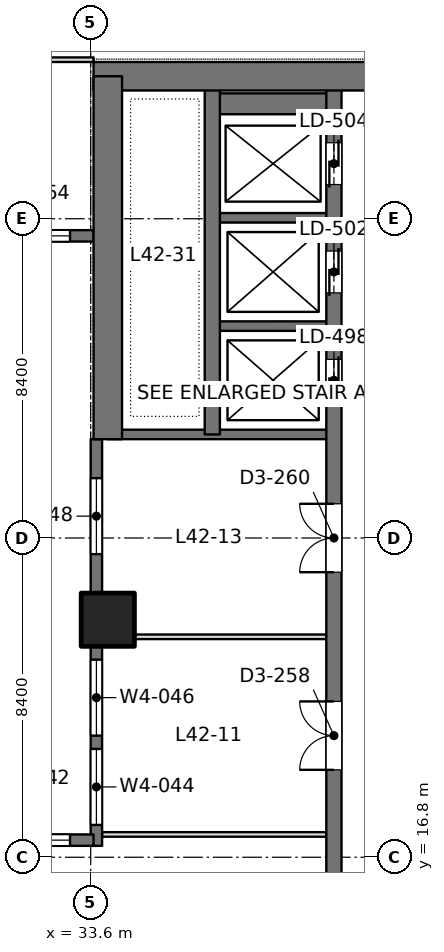
"""IFC4 building model, lengths in metres.
Left out: names, types, materials, properties, quantities, classifications, styles, units other than length and angle.
Written with IfcOpenShell. Run it as: python <this file> out.ifc"""

import sys

from ifc_helpers import new_model, si_unit, direction, frame, frame_2d, origin, origin_2d, place, context, subcontext, project, spatial, rectangle, extrude, element, fill, save


model = new_model("IFC4")
c1 = context("Model", 3, precision=1e-05, world=origin(), true_north=direction((0.0, 1.0)))
c2 = subcontext(c1, "Body", "Model", "MODEL_VIEW")
j1 = project(units=[si_unit("LENGTHUNIT", "METRE"), si_unit("PLANEANGLEUNIT", "RADIAN")], contexts=[c1])
p1 = place(None, origin())
s1 = spatial("IfcSite", under=j1, at=p1, CompositionType="ELEMENT")
p2 = place(p1, origin())
s2 = spatial("IfcBuilding", under=s1, at=p2, CompositionType="ELEMENT")
p3 = place(p2, frame((0.0, 0.0, 186.0)))
s3 = spatial("IfcBuildingStorey", under=s2, at=p3, CompositionType="ELEMENT", Elevation=186.0)
p4 = place(p3, frame((34.05, 23.05, 0.0), z_axis=(0.0, 0.0, 1.0), x_axis=(1.0, 0.0, 0.0)))
e1 = element("IfcColumn", 1, at=p4, inside=s3, PredefinedType="COLUMN", context=c2, shape_type="SweptSolid", body=[
    extrude(rectangle(XDim=1.4, YDim=1.4, at=origin_2d()), origin(), (0.0, 0.0, 1.0), 4.2),
])
p5 = place(p3, frame((33.675, 37.35, 0.0), z_axis=(0.0, 0.0, 1.0), x_axis=(1.0, 0.0, 0.0)))
e2 = element("IfcWall", 2, at=p5, inside=s3, PredefinedType="SHEAR", context=c2, shape_type="SweptSolid", body=[
    extrude(rectangle(XDim=17.85, YDim=0.75, at=frame_2d((8.925, 0.0))), origin(), (0.0, 0.0, 1.0), 4.2),
])
p6 = place(p5, frame((7.175, 0.0, 0.0)))
e3 = element("IfcOpeningElement", 3, at=p6, cuts=e2, PredefinedType="OPENING", context=c2, shape_type="SweptSolid", body=[
    extrude(rectangle(XDim=1.8, YDim=2.4, at=frame_2d((0.9, 1.2))), frame((0.0, 0.385, 0.0), z_axis=(0.0, -1.0, 0.0), x_axis=(1.0, 0.0, 0.0)), (0.0, 0.0, 1.0), 0.77),
])
p7 = place(p3, frame((34.05, 27.8, 0.0), z_axis=(0.0, 0.0, 1.0), x_axis=(0.0, 1.0, 0.0)))
e4 = element("IfcWall", 4, at=p7, inside=s3, PredefinedType="SHEAR", context=c2, shape_type="SweptSolid", body=[
    extrude(rectangle(XDim=9.55, YDim=0.75, at=frame_2d((4.775, 0.0))), origin(), (0.0, 0.0, 1.0), 4.2),
])
p8 = place(p3, frame((40.0, 13.05, 0.0), z_axis=(0.0, 0.0, 1.0), x_axis=(0.0, 1.0, 0.0)))
e5 = element("IfcWall", 5, at=p8, inside=s3, PredefinedType="SHEAR", context=c2, shape_type="SweptSolid", body=[
    extrude(rectangle(XDim=24.3, YDim=0.4, at=frame_2d((12.15, 0.0))), origin(), (0.0, 0.0, 1.0), 4.2),
])
p9 = place(p8, frame((15.75, 0.0, 0.0)))
e6 = element("IfcOpeningElement", 6, at=p9, cuts=e5, PredefinedType="OPENING", context=c2, shape_type="SweptSolid", body=[
    extrude(rectangle(XDim=1.1, YDim=2.2, at=frame_2d((0.55, 1.1))), frame((0.0, 0.21, 0.0), z_axis=(0.0, -1.0, 0.0), x_axis=(1.0, 0.0, 0.0)), (0.0, 0.0, 1.0), 0.42),
])
p10 = place(p8, frame((18.6, 0.0, 0.0)))
e7 = element("IfcOpeningElement", 7, at=p10, cuts=e5, PredefinedType="OPENING", context=c2, shape_type="SweptSolid", body=[
    extrude(rectangle(XDim=1.1, YDim=2.2, at=frame_2d((0.55, 1.1))), frame((0.0, 0.21, 0.0), z_axis=(0.0, -1.0, 0.0), x_axis=(1.0, 0.0, 0.0)), (0.0, 0.0, 1.0), 0.42),
])
p11 = place(p8, frame((21.45, 0.0, 0.0)))
e8 = element("IfcOpeningElement", 8, at=p11, cuts=e5, PredefinedType="OPENING", context=c2, shape_type="SweptSolid", body=[
    extrude(rectangle(XDim=1.1, YDim=2.2, at=frame_2d((0.55, 1.1))), frame((0.0, 0.21, 0.0), z_axis=(0.0, -1.0, 0.0), x_axis=(1.0, 0.0, 0.0)), (0.0, 0.0, 1.0), 0.42),
])
p12 = place(p8, frame((6.05, 0.0, 0.0)))
e9 = element("IfcOpeningElement", 9, at=p12, cuts=e5, PredefinedType="OPENING", context=c2, shape_type="SweptSolid", body=[
    extrude(rectangle(XDim=1.8, YDim=2.4, at=frame_2d((0.9, 1.2))), frame((0.0, 0.21, 0.0), z_axis=(0.0, -1.0, 0.0), x_axis=(1.0, 0.0, 0.0)), (0.0, 0.0, 1.0), 0.42),
])
p13 = place(p8, frame((11.25, 0.0, 0.0)))
e10 = element("IfcOpeningElement", 10, at=p13, cuts=e5, PredefinedType="OPENING", context=c2, shape_type="SweptSolid", body=[
    extrude(rectangle(XDim=1.8, YDim=2.4, at=frame_2d((0.9, 1.2))), frame((0.0, 0.21, 0.0), z_axis=(0.0, -1.0, 0.0), x_axis=(1.0, 0.0, 0.0)), (0.0, 0.0, 1.0), 0.42),
])
p14 = place(p3, frame((36.8, 27.925, 0.0), z_axis=(0.0, 0.0, 1.0), x_axis=(0.0, 1.0, 0.0)))
e11 = element("IfcWall", 11, at=p14, inside=s3, PredefinedType="SHEAR", context=c2, shape_type="SweptSolid", body=[
    extrude(rectangle(XDim=9.425, YDim=0.4, at=frame_2d((4.712, 0.0))), origin(), (0.0, 0.0, 1.0), 4.2),
])
p15 = place(p3, frame((40.0, 27.925, 0.0), z_axis=(0.0, 0.0, 1.0), x_axis=(-1.0, 0.0, 0.0)))
e12 = element("IfcWall", 12, at=p15, inside=s3, PredefinedType="SHEAR", context=c2, shape_type="SweptSolid", body=[
    extrude(rectangle(XDim=5.95, YDim=0.25, at=frame_2d((2.975, 0.0))), origin(), (0.0, 0.0, 1.0), 4.2),
])
for number, where, z_axis, x_axis in (
    (13, (40.0, 30.775, 0.0), (0.0, 0.0, 1.0), (-1.0, 0.0, 0.0)),
    (14, (40.0, 33.625, 0.0), (0.0, 0.0, 1.0), (-1.0, 0.0, 0.0)),
):
    element("IfcWall", number, at=place(p3, frame(where, z_axis=z_axis, x_axis=x_axis)), inside=s3, PredefinedType="SHEAR", context=c2, shape_type="SweptSolid", body=[
        extrude(rectangle(XDim=3.2, YDim=0.25, at=frame_2d((1.6, 0.0))), origin(), (0.0, 0.0, 1.0), 4.2),
    ])
p16 = place(p3, frame((40.0, 36.625, 0.0), z_axis=(0.0, 0.0, 1.0), x_axis=(-1.0, 0.0, 0.0)))
e15 = element("IfcWall", 15, at=p16, inside=s3, PredefinedType="SHEAR", context=c2, shape_type="SweptSolid", body=[
    extrude(rectangle(XDim=3.2, YDim=0.55, at=frame_2d((1.6, 0.0))), origin(), (0.0, 0.0, 1.0), 4.2),
])
p17 = place(p3, frame((33.75, 17.1, 0.0), z_axis=(0.0, 0.0, 1.0), x_axis=(0.0, 1.0, 0.0)))
e16 = element("IfcWall", 16, at=p17, inside=s3, PredefinedType="SOLIDWALL", context=c2, shape_type="SweptSolid", body=[
    extrude(rectangle(XDim=10.7, YDim=0.3, at=frame_2d((5.35, 0.0))), origin(), (0.0, 0.0, 1.0), 4.05),
])
p18 = place(p17, frame((0.55, 0.0, 0.9)))
e17 = element("IfcOpeningElement", 17, at=p18, cuts=e16, PredefinedType="OPENING", context=c2, shape_type="SweptSolid", body=[
    extrude(rectangle(XDim=2.0, YDim=1.9, at=frame_2d((1.0, 0.95))), frame((0.0, 0.16, 0.0), z_axis=(0.0, -1.0, 0.0), x_axis=(1.0, 0.0, 0.0)), (0.0, 0.0, 1.0), 0.32),
])
p19 = place(p17, frame((2.9, 0.0, 0.9)))
e18 = element("IfcOpeningElement", 18, at=p19, cuts=e16, PredefinedType="OPENING", context=c2, shape_type="SweptSolid", body=[
    extrude(rectangle(XDim=2.0, YDim=1.9, at=frame_2d((1.0, 0.95))), frame((0.0, 0.16, 0.0), z_axis=(0.0, -1.0, 0.0), x_axis=(1.0, 0.0, 0.0)), (0.0, 0.0, 1.0), 0.32),
])
p20 = place(p17, frame((7.675, 0.0, 0.9)))
e19 = element("IfcOpeningElement", 19, at=p20, cuts=e16, PredefinedType="OPENING", context=c2, shape_type="SweptSolid", body=[
    extrude(rectangle(XDim=2.0, YDim=1.9, at=frame_2d((1.0, 0.95))), frame((0.0, 0.16, 0.0), z_axis=(0.0, -1.0, 0.0), x_axis=(1.0, 0.0, 0.0)), (0.0, 0.0, 1.0), 0.32),
])
p21 = place(p3, frame((25.75, 17.25, 0.0), z_axis=(0.0, 0.0, 1.0), x_axis=(1.0, 0.0, 0.0)))
e20 = element("IfcWall", 20, at=p21, inside=s3, PredefinedType="SOLIDWALL", context=c2, shape_type="SweptSolid", body=[
    extrude(rectangle(XDim=7.925, YDim=0.3, at=frame_2d((3.962, 0.0))), origin(), (0.0, 0.0, 1.0), 4.05),
])
p22 = place(p21, frame((0.069, 0.0, 0.9)))
e21 = element("IfcOpeningElement", 21, at=p22, cuts=e20, PredefinedType="OPENING", context=c2, shape_type="SweptSolid", body=[
    extrude(rectangle(XDim=2.0, YDim=1.9, at=frame_2d((1.0, 0.95))), frame((0.0, 0.16, 0.0), z_axis=(0.0, -1.0, 0.0), x_axis=(1.0, 0.0, 0.0)), (0.0, 0.0, 1.0), 0.32),
])
p23 = place(p21, frame((2.688, 0.0, 0.9)))
e22 = element("IfcOpeningElement", 22, at=p23, cuts=e20, PredefinedType="OPENING", context=c2, shape_type="SweptSolid", body=[
    extrude(rectangle(XDim=2.0, YDim=1.9, at=frame_2d((1.0, 0.95))), frame((0.0, 0.16, 0.0), z_axis=(0.0, -1.0, 0.0), x_axis=(1.0, 0.0, 0.0)), (0.0, 0.0, 1.0), 0.32),
])
p24 = place(p21, frame((5.306, 0.0, 0.9)))
e23 = element("IfcOpeningElement", 23, at=p24, cuts=e20, PredefinedType="OPENING", context=c2, shape_type="SweptSolid", body=[
    extrude(rectangle(XDim=2.0, YDim=1.9, at=frame_2d((1.0, 0.95))), frame((0.0, 0.16, 0.0), z_axis=(0.0, -1.0, 0.0), x_axis=(1.0, 0.0, 0.0)), (0.0, 0.0, 1.0), 0.32),
])
p25 = place(p3, frame((25.75, 33.15, 0.0), z_axis=(0.0, 0.0, 1.0), x_axis=(1.0, 0.0, 0.0)))
e24 = element("IfcWall", 24, at=p25, inside=s3, PredefinedType="SOLIDWALL", context=c2, shape_type="SweptSolid", body=[
    extrude(rectangle(XDim=7.925, YDim=0.3, at=frame_2d((3.962, 0.0))), origin(), (0.0, 0.0, 1.0), 4.05),
])
p26 = place(p25, frame((0.069, 0.0, 0.9)))
e25 = element("IfcOpeningElement", 25, at=p26, cuts=e24, PredefinedType="OPENING", context=c2, shape_type="SweptSolid", body=[
    extrude(rectangle(XDim=2.0, YDim=1.9, at=frame_2d((1.0, 0.95))), frame((0.0, 0.16, 0.0), z_axis=(0.0, -1.0, 0.0), x_axis=(1.0, 0.0, 0.0)), (0.0, 0.0, 1.0), 0.32),
])
p27 = place(p25, frame((2.688, 0.0, 0.9)))
e26 = element("IfcOpeningElement", 26, at=p27, cuts=e24, PredefinedType="OPENING", context=c2, shape_type="SweptSolid", body=[
    extrude(rectangle(XDim=2.0, YDim=1.9, at=frame_2d((1.0, 0.95))), frame((0.0, 0.16, 0.0), z_axis=(0.0, -1.0, 0.0), x_axis=(1.0, 0.0, 0.0)), (0.0, 0.0, 1.0), 0.32),
])
p28 = place(p25, frame((5.306, 0.0, 0.9)))
e27 = element("IfcOpeningElement", 27, at=p28, cuts=e24, PredefinedType="OPENING", context=c2, shape_type="SweptSolid", body=[
    extrude(rectangle(XDim=2.0, YDim=1.9, at=frame_2d((1.0, 0.95))), frame((0.0, 0.16, 0.0), z_axis=(0.0, -1.0, 0.0), x_axis=(1.0, 0.0, 0.0)), (0.0, 0.0, 1.0), 0.32),
])
p29 = place(p3, frame((33.898, 17.4, 0.0), z_axis=(0.0, 0.0, 1.0), x_axis=(1.0, 0.0, 0.0)))
e28 = element("IfcWall", 28, at=p29, inside=s3, PredefinedType="PARTITIONING", context=c2, shape_type="SweptSolid", body=[
    extrude(rectangle(XDim=5.904, YDim=0.12, at=frame_2d((2.952, 0.0))), origin(), (0.0, 0.0, 1.0), 3.55),
])
p30 = place(p3, frame((34.749, 22.6, 0.0), z_axis=(0.0, 0.0, 1.0), x_axis=(1.0, 0.0, 0.0)))
e29 = element("IfcWall", 29, at=p30, inside=s3, PredefinedType="PARTITIONING", context=c2, shape_type="SweptSolid", body=[
    extrude(rectangle(XDim=5.053, YDim=0.12, at=frame_2d((2.526, 0.0))), origin(), (0.0, 0.0, 1.0), 4.05),
])
p31 = place(p3, frame((16.725, 37.785, 0.0), z_axis=(0.0, 0.0, 1.0), x_axis=(1.0, 0.0, 0.0)))
e30 = element("IfcWall", 30, at=p31, inside=s3, PredefinedType="PARTITIONING", context=c2, shape_type="SweptSolid", body=[
    extrude(rectangle(XDim=16.95, YDim=0.12, at=frame_2d((8.475, 0.0))), origin(), (0.0, 0.0, 1.0), 3.55),
])
p32 = place(p31, frame((7.575, 0.0, 0.0)))
e31 = element("IfcOpeningElement", 31, at=p32, cuts=e30, PredefinedType="OPENING", context=c2, shape_type="SweptSolid", body=[
    extrude(rectangle(XDim=1.8, YDim=2.2, at=frame_2d((0.9, 1.1))), frame((0.0, 0.07, 0.0), z_axis=(0.0, -1.0, 0.0), x_axis=(1.0, 0.0, 0.0)), (0.0, 0.0, 1.0), 0.14),
])
p33 = place(p18, origin())
e32 = element("IfcWindow", 32, at=p33, inside=s3, PartitioningType="SINGLE_PANEL", PredefinedType="WINDOW", context=c2, shape_type="SweptSolid", body=[
    extrude(rectangle(XDim=2.0, YDim=1.9, at=frame_2d((1.0, 0.95))), frame((0.0, 0.03, 0.0), z_axis=(0.0, -1.0, 0.0), x_axis=(1.0, 0.0, 0.0)), (0.0, 0.0, 1.0), 0.06),
])
fill(e17, e32)
p34 = place(p19, origin())
e33 = element("IfcWindow", 33, at=p34, inside=s3, PartitioningType="SINGLE_PANEL", PredefinedType="WINDOW", context=c2, shape_type="SweptSolid", body=[
    extrude(rectangle(XDim=2.0, YDim=1.9, at=frame_2d((1.0, 0.95))), frame((0.0, 0.03, 0.0), z_axis=(0.0, -1.0, 0.0), x_axis=(1.0, 0.0, 0.0)), (0.0, 0.0, 1.0), 0.06),
])
fill(e18, e33)
p35 = place(p20, origin())
e34 = element("IfcWindow", 34, at=p35, inside=s3, PartitioningType="SINGLE_PANEL", PredefinedType="WINDOW", context=c2, shape_type="SweptSolid", body=[
    extrude(rectangle(XDim=2.0, YDim=1.9, at=frame_2d((1.0, 0.95))), frame((0.0, 0.03, 0.0), z_axis=(0.0, -1.0, 0.0), x_axis=(1.0, 0.0, 0.0)), (0.0, 0.0, 1.0), 0.06),
])
fill(e19, e34)
p36 = place(p24, origin())
e35 = element("IfcWindow", 35, at=p36, inside=s3, PartitioningType="SINGLE_PANEL", PredefinedType="WINDOW", context=c2, shape_type="SweptSolid", body=[
    extrude(rectangle(XDim=2.0, YDim=1.9, at=frame_2d((1.0, 0.95))), frame((0.0, 0.03, 0.0), z_axis=(0.0, -1.0, 0.0), x_axis=(1.0, 0.0, 0.0)), (0.0, 0.0, 1.0), 0.06),
])
fill(e23, e35)
p37 = place(p28, origin())
e36 = element("IfcWindow", 36, at=p37, inside=s3, PartitioningType="SINGLE_PANEL", PredefinedType="WINDOW", context=c2, shape_type="SweptSolid", body=[
    extrude(rectangle(XDim=2.0, YDim=1.9, at=frame_2d((1.0, 0.95))), frame((0.0, 0.03, 0.0), z_axis=(0.0, -1.0, 0.0), x_axis=(1.0, 0.0, 0.0)), (0.0, 0.0, 1.0), 0.06),
])
fill(e27, e36)
p38 = place(p9, origin())
e37 = element("IfcDoor", 37, at=p38, inside=s3, OperationType="DOUBLE_DOOR_SLIDING", PredefinedType="DOOR", context=c2, shape_type="SweptSolid", body=[
    extrude(rectangle(XDim=1.1, YDim=2.2, at=frame_2d((0.55, 1.1))), frame((0.0, 0.025, 0.0), z_axis=(0.0, -1.0, 0.0), x_axis=(1.0, 0.0, 0.0)), (0.0, 0.0, 1.0), 0.05),
])
fill(e6, e37)
p39 = place(p10, origin())
e38 = element("IfcDoor", 38, at=p39, inside=s3, OperationType="DOUBLE_DOOR_SLIDING", PredefinedType="DOOR", context=c2, shape_type="SweptSolid", body=[
    extrude(rectangle(XDim=1.1, YDim=2.2, at=frame_2d((0.55, 1.1))), frame((0.0, 0.025, 0.0), z_axis=(0.0, -1.0, 0.0), x_axis=(1.0, 0.0, 0.0)), (0.0, 0.0, 1.0), 0.05),
])
fill(e7, e38)
p40 = place(p11, origin())
e39 = element("IfcDoor", 39, at=p40, inside=s3, OperationType="DOUBLE_DOOR_SLIDING", PredefinedType="DOOR", context=c2, shape_type="SweptSolid", body=[
    extrude(rectangle(XDim=1.1, YDim=2.2, at=frame_2d((0.55, 1.1))), frame((0.0, 0.025, 0.0), z_axis=(0.0, -1.0, 0.0), x_axis=(1.0, 0.0, 0.0)), (0.0, 0.0, 1.0), 0.05),
])
fill(e8, e39)
p41 = place(p12, origin())
e40 = element("IfcDoor", 40, at=p41, inside=s3, OperationType="DOUBLE_DOOR_SINGLE_SWING", PredefinedType="DOOR", context=c2, shape_type="SweptSolid", body=[
    extrude(rectangle(XDim=1.8, YDim=2.4, at=frame_2d((0.9, 1.2))), frame((0.0, 0.025, 0.0), z_axis=(0.0, -1.0, 0.0), x_axis=(1.0, 0.0, 0.0)), (0.0, 0.0, 1.0), 0.05),
])
fill(e9, e40)
p42 = place(p13, origin())
e41 = element("IfcDoor", 41, at=p42, inside=s3, OperationType="DOUBLE_DOOR_SINGLE_SWING", PredefinedType="DOOR", context=c2, shape_type="SweptSolid", body=[
    extrude(rectangle(XDim=1.8, YDim=2.4, at=frame_2d((0.9, 1.2))), frame((0.0, 0.025, 0.0), z_axis=(0.0, -1.0, 0.0), x_axis=(1.0, 0.0, 0.0)), (0.0, 0.0, 1.0), 0.05),
])
fill(e10, e41)
save(model, sys.argv[1])
